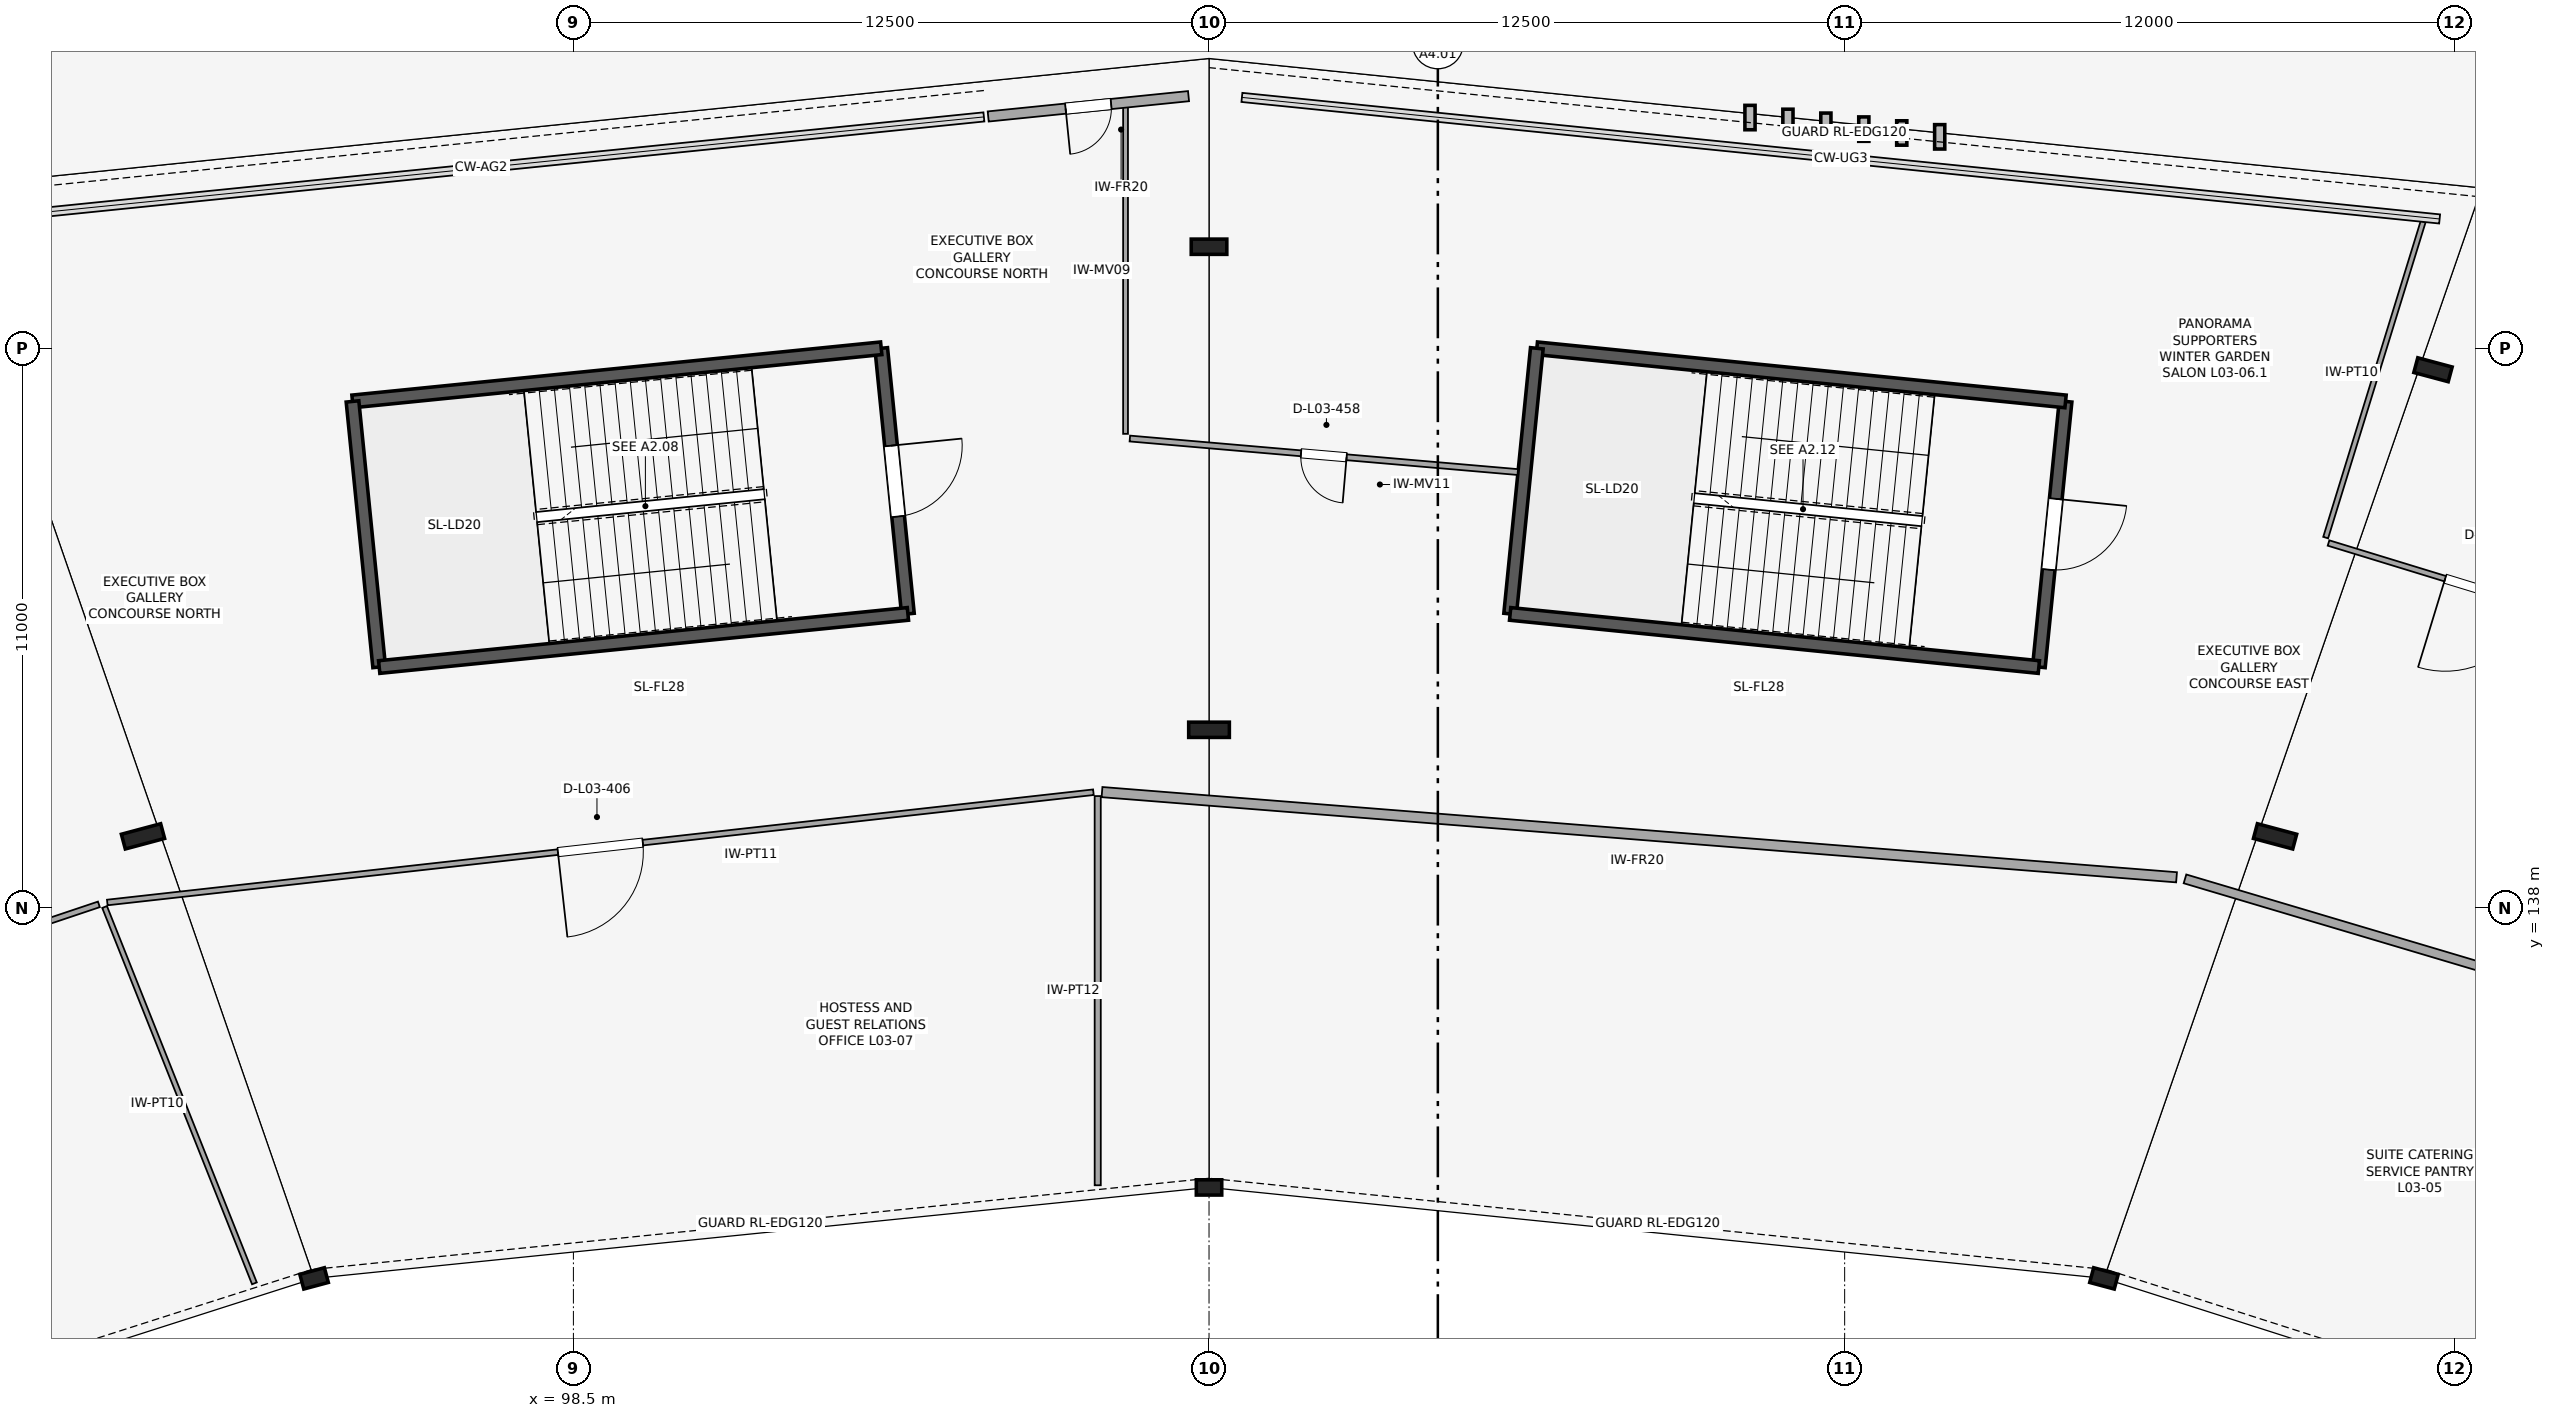
"""IFC4 building model, lengths in metres.
Left out: names, types, materials, properties, quantities, classifications, styles, units other than length and angle.
Written with IfcOpenShell. Run it as: python <this file> out.ifc"""

import sys

from ifc_helpers import new_model, si_unit, direction, frame, frame_2d, origin, origin_2d, place, context, subcontext, project, spatial, rectangle, i_section, extrude, element, fill, save


model = new_model("IFC4")
c1 = context("Model", 3, precision=1e-05, world=origin(), true_north=direction((0.0, 1.0)))
c2 = subcontext(c1, "Body", "Model", "MODEL_VIEW")
j1 = project(units=[si_unit("LENGTHUNIT", "METRE"), si_unit("PLANEANGLEUNIT", "RADIAN")], contexts=[c1])
p1 = place(None, origin())
s1 = spatial("IfcSite", under=j1, at=p1, CompositionType="ELEMENT")
p2 = place(p1, origin())
s2 = spatial("IfcBuilding", under=s1, at=p2, CompositionType="ELEMENT")
p3 = place(p2, frame((0.0, 0.0, 15.6)))
s3 = spatial("IfcBuildingStorey", under=s2, at=p3, CompositionType="ELEMENT", Elevation=15.6)
for number, where, z_axis, x_axis in (
    (1, (128.6, 130.711, 0.0), (0.0, 0.0, 1.0), (0.259, 0.966, 0.0)),
    (2, (111.0, 132.5, 0.0), (0.0, 0.0, 1.0), (0.0, 1.0, 0.0)),
    (3, (93.4, 130.711, 0.0), (0.0, 0.0, 1.0), (-0.259, 0.966, 0.0)),
):
    element("IfcColumn", number, at=place(p3, frame(where, z_axis=z_axis, x_axis=x_axis)), inside=s3, PredefinedType="COLUMN", context=c2, shape_type="SweptSolid", body=[
        extrude(i_section(OverallWidth=0.3, OverallDepth=0.5, WebThickness=0.014, FlangeThickness=0.028, FilletRadius=0.027, at=origin_2d()), origin(), (0.0, 0.0, 1.0), 3.48),
    ])
for number, where, z_axis, x_axis in (
    (4, (131.964, 139.404, 0.0), (0.0, 0.0, 1.0), (0.259, 0.966, 0.0)),
    (5, (111.0, 141.5, 0.0), (0.0, 0.0, 1.0), (0.0, 1.0, 0.0)),
    (6, (90.036, 139.404, 0.0), (0.0, 0.0, 1.0), (-0.259, 0.966, 0.0)),
):
    element("IfcColumn", number, at=place(p3, frame(where, z_axis=z_axis, x_axis=x_axis)), inside=s3, PredefinedType="COLUMN", context=c2, shape_type="SweptSolid", body=[
        extrude(i_section(OverallWidth=0.3, OverallDepth=0.8, WebThickness=0.018, FlangeThickness=0.033, FilletRadius=0.03, at=origin_2d()), origin(), (0.0, 0.0, 1.0), 5.2),
    ])
for number, where, z_axis, x_axis in (
    (7, (135.07, 148.581, 0.0), (0.0, 0.0, 1.0), (0.259, 0.966, 0.0)),
    (8, (111.0, 151.0, 0.0), (0.0, 0.0, 1.0), (0.0, 1.0, 0.0)),
):
    element("IfcColumn", number, at=place(p3, frame(where, z_axis=z_axis, x_axis=x_axis)), inside=s3, PredefinedType="COLUMN", context=c2, shape_type="SweptSolid", body=[
        extrude(i_section(OverallWidth=0.3, OverallDepth=0.7, WebThickness=0.017, FlangeThickness=0.032, FilletRadius=0.027, at=origin_2d()), origin(), (0.0, 0.0, 1.0), 5.2),
    ])
p4 = place(p3, frame((105.079, 143.779, 0.0), z_axis=(0.0, 0.0, 1.0), x_axis=(-0.100028593886, 0.994984562898, 0.0)))
e9 = element("IfcWall", 9, at=p4, inside=s3, PredefinedType="SHEAR", context=c2, shape_type="SweptSolid", body=[
    extrude(rectangle(XDim=5.25, YDim=0.25, at=frame_2d((2.625, 0.0))), origin(), (0.0, 0.0, 1.0), 4.9),
])
p5 = place(p4, frame((1.925, 0.0, 0.0)))
e10 = element("IfcOpeningElement", 10, at=p5, cuts=e9, PredefinedType="OPENING", context=c2, shape_type="SweptSolid", body=[
    extrude(rectangle(XDim=1.4, YDim=2.2, at=frame_2d((0.7, 1.1))), frame((0.0, 0.135, 0.0), z_axis=(0.0, -1.0, 0.0), x_axis=(1.0, 0.0, 0.0)), (0.0, 0.0, 1.0), 0.27),
])
p6 = place(p3, frame((104.553, 149.003, 0.0), z_axis=(0.0, 0.0, 1.0), x_axis=(-0.994985938948, -0.100014905366, 0.0)))
e11 = element("IfcWall", 11, at=p6, inside=s3, PredefinedType="SHEAR", context=c2, shape_type="SweptSolid", body=[
    extrude(rectangle(XDim=10.45, YDim=0.25, at=frame_2d((5.225, 0.0))), origin(), (0.0, 0.0, 1.0), 4.9),
])
p7 = place(p3, frame((94.156, 147.958, 0.0), z_axis=(0.0, 0.0, 1.0), x_axis=(0.100028593886, -0.994984562898, 0.0)))
e12 = element("IfcWall", 12, at=p7, inside=s3, PredefinedType="SHEAR", context=c2, shape_type="SweptSolid", body=[
    extrude(rectangle(XDim=5.25, YDim=0.25, at=frame_2d((2.625, 0.0))), origin(), (0.0, 0.0, 1.0), 4.9),
])
p8 = place(p3, frame((94.681, 142.734, 0.0), z_axis=(0.0, 0.0, 1.0), x_axis=(0.994985938948, 0.100014905366, 0.0)))
e13 = element("IfcWall", 13, at=p8, inside=s3, PredefinedType="SHEAR", context=c2, shape_type="SweptSolid", body=[
    extrude(rectangle(XDim=10.45, YDim=0.25, at=frame_2d((5.225, 0.0))), origin(), (0.0, 0.0, 1.0), 4.9),
])
p9 = place(p3, frame((127.319, 142.734, 0.0), z_axis=(0.0, 0.0, 1.0), x_axis=(0.10002396577, 0.994985028165, 0.0)))
e14 = element("IfcWall", 14, at=p9, inside=s3, PredefinedType="SHEAR", context=c2, shape_type="SweptSolid", body=[
    extrude(rectangle(XDim=5.25, YDim=0.25, at=frame_2d((2.625, 0.0))), origin(), (0.0, 0.0, 1.0), 4.9),
])
p10 = place(p9, frame((1.925, 0.0, 0.0)))
e15 = element("IfcOpeningElement", 15, at=p10, cuts=e14, PredefinedType="OPENING", context=c2, shape_type="SweptSolid", body=[
    extrude(rectangle(XDim=1.4, YDim=2.2, at=frame_2d((0.7, 1.1))), frame((0.0, 0.135, 0.0), z_axis=(0.0, -1.0, 0.0), x_axis=(1.0, 0.0, 0.0)), (0.0, 0.0, 1.0), 0.27),
])
p11 = place(p3, frame((127.844, 147.958, 0.0), z_axis=(0.0, 0.0, 1.0), x_axis=(-0.994988263568, 0.09999177647, 0.0)))
e16 = element("IfcWall", 16, at=p11, inside=s3, PredefinedType="SHEAR", context=c2, shape_type="SweptSolid", body=[
    extrude(rectangle(XDim=10.45, YDim=0.25, at=frame_2d((5.225, 0.0))), origin(), (0.0, 0.0, 1.0), 4.9),
])
p12 = place(p3, frame((117.447, 149.003, 0.0), z_axis=(0.0, 0.0, 1.0), x_axis=(-0.099982555566, -0.994989190184, 0.0)))
e17 = element("IfcWall", 17, at=p12, inside=s3, PredefinedType="SHEAR", context=c2, shape_type="SweptSolid", body=[
    extrude(rectangle(XDim=5.25, YDim=0.25, at=frame_2d((2.625, 0.0))), origin(), (0.0, 0.0, 1.0), 4.9),
])
p13 = place(p3, frame((116.922, 143.779, 0.0), z_axis=(0.0, 0.0, 1.0), x_axis=(0.994985705245, -0.100017230303, 0.0)))
e18 = element("IfcWall", 18, at=p13, inside=s3, PredefinedType="SHEAR", context=c2, shape_type="SweptSolid", body=[
    extrude(rectangle(XDim=10.45, YDim=0.25, at=frame_2d((5.225, 0.0))), origin(), (0.0, 0.0, 1.0), 4.9),
])
p14 = place(p3, frame((149.96, 132.688, 0.0), z_axis=(0.0, 0.0, 1.0), x_axis=(-0.958492296074, 0.285118428668, 0.0)))
e19 = element("IfcWall", 19, at=p14, inside=s3, PredefinedType="PARTITIONING", context=c2, shape_type="SweptSolid", body=[
    extrude(rectangle(XDim=20.623, YDim=0.18, at=frame_2d((10.311, 0.0))), origin(), (0.0, 0.0, 1.0), 2.45),
])
p15 = place(p14, frame((9.861, 0.0, 0.0)))
e20 = element("IfcOpeningElement", 20, at=p15, cuts=e19, PredefinedType="OPENING", context=c2, shape_type="SweptSolid", body=[
    extrude(rectangle(XDim=0.9, YDim=2.24, at=frame_2d((0.45, 1.12))), frame((0.0, 0.1, 0.0), z_axis=(0.0, -1.0, 0.0), x_axis=(1.0, 0.0, 0.0)), (0.0, 0.0, 1.0), 0.2),
])
p16 = place(p3, frame((130.027, 138.599, 0.0), z_axis=(0.0, 0.0, 1.0), x_axis=(-0.996870264064, 0.079054896279, 0.0)))
e21 = element("IfcWall", 21, at=p16, inside=s3, PredefinedType="PARTITIONING", context=c2, shape_type="SweptSolid", body=[
    extrude(rectangle(XDim=21.198, YDim=0.2, at=frame_2d((10.599, 0.0))), origin(), (0.0, 0.0, 1.0), 2.45),
])
p17 = place(p3, frame((108.811, 132.542, 0.0), z_axis=(0.0, 0.0, 1.0), x_axis=(-6.3793818e-05, 0.999999997965, 0.0)))
e22 = element("IfcWall", 22, at=p17, inside=s3, PredefinedType="PARTITIONING", context=c2, shape_type="SweptSolid", body=[
    extrude(rectangle(XDim=7.654, YDim=0.12, at=frame_2d((3.827, 0.0))), origin(), (0.0, 0.0, 1.0), 2.45),
])
p18 = place(p3, frame((108.726, 140.272, 0.0), z_axis=(0.0, 0.0, 1.0), x_axis=(-0.993803678033, -0.111149671744, 0.0)))
e23 = element("IfcWall", 23, at=p18, inside=s3, PredefinedType="PARTITIONING", context=c2, shape_type="SweptSolid", body=[
    extrude(rectangle(XDim=19.514, YDim=0.11, at=frame_2d((9.757, 0.0))), origin(), (0.0, 0.0, 1.0), 2.45),
])
p19 = place(p18, frame((8.917, 0.0, 0.0)))
e24 = element("IfcOpeningElement", 24, at=p19, cuts=e23, PredefinedType="OPENING", context=c2, shape_type="SweptSolid", body=[
    extrude(rectangle(XDim=1.68, YDim=2.24, at=frame_2d((0.84, 1.12))), frame((0.0, 0.065, 0.0), z_axis=(0.0, -1.0, 0.0), x_axis=(1.0, 0.0, 0.0)), (0.0, 0.0, 1.0), 0.13),
])
p20 = place(p3, frame((92.227, 130.614, 0.0), z_axis=(0.0, 0.0, 1.0), x_axis=(-0.369873703132, 0.929082043595, 0.0)))
e25 = element("IfcWall", 25, at=p20, inside=s3, PredefinedType="PARTITIONING", context=c2, shape_type="SweptSolid", body=[
    extrude(rectangle(XDim=7.966, YDim=0.1, at=frame_2d((3.983, 0.0))), origin(), (0.0, 0.0, 1.0), 2.45),
])
p21 = place(p3, frame((89.168, 138.067, 0.0), z_axis=(0.0, 0.0, 1.0), x_axis=(-0.948002856897, -0.318261815671, 0.0)))
e26 = element("IfcWall", 26, at=p21, inside=s3, PredefinedType="MOVABLE", context=c2, shape_type="SweptSolid", body=[
    extrude(rectangle(XDim=20.661, YDim=0.115, at=frame_2d((10.331, 0.0))), origin(), (0.0, 0.0, 1.0), 2.45),
])
p22 = place(p21, frame((9.421, 0.0, 0.0)))
e27 = element("IfcOpeningElement", 27, at=p22, cuts=e26, PredefinedType="OPENING", context=c2, shape_type="SweptSolid", body=[
    extrude(rectangle(XDim=1.82, YDim=2.1, at=frame_2d((0.91, 1.05))), frame((0.0, 0.067, 0.0), z_axis=(0.0, -1.0, 0.0), x_axis=(1.0, 0.0, 0.0)), (0.0, 0.0, 1.0), 0.135),
])
p23 = place(p3, frame((139.344, 143.236, 0.0), z_axis=(0.0, 0.0, 1.0), x_axis=(-0.956207119829, 0.29269086762, 0.0)))
e28 = element("IfcWall", 28, at=p23, inside=s3, PredefinedType="PARTITIONING", context=c2, shape_type="SweptSolid", body=[
    extrude(rectangle(XDim=6.618, YDim=0.11, at=frame_2d((3.309, 0.0))), origin(), (0.0, 0.0, 1.0), 2.45),
])
p24 = place(p23, frame((2.399, 0.0, 0.0)))
e29 = element("IfcOpeningElement", 29, at=p24, cuts=e28, PredefinedType="OPENING", context=c2, shape_type="SweptSolid", body=[
    extrude(rectangle(XDim=1.82, YDim=2.1, at=frame_2d((0.91, 1.05))), frame((0.0, 0.065, 0.0), z_axis=(0.0, -1.0, 0.0), x_axis=(1.0, 0.0, 0.0)), (0.0, 0.0, 1.0), 0.13),
])
p25 = place(p3, frame((132.959, 145.28, 0.0), z_axis=(0.0, 0.0, 1.0), x_axis=(0.294776767563, 0.955566144914, 0.0)))
e30 = element("IfcWall", 30, at=p25, inside=s3, PredefinedType="PARTITIONING", context=c2, shape_type="SweptSolid", body=[
    extrude(rectangle(XDim=6.505, YDim=0.1, at=frame_2d((3.252, 0.0))), origin(), (0.0, 0.0, 1.0), 2.45),
])
p26 = place(p3, frame((117.071, 146.569, 0.0), z_axis=(0.0, 0.0, 1.0), x_axis=(-0.99628984103, 0.086061330803, 0.0)))
e31 = element("IfcWall", 31, at=p26, inside=s3, PredefinedType="MOVABLE", context=c2, shape_type="SweptSolid", body=[
    extrude(rectangle(XDim=7.656, YDim=0.115, at=frame_2d((3.828, 0.0))), origin(), (0.0, 0.0, 1.0), 2.45),
])
p27 = place(p26, frame((3.378, 0.0, 0.0)))
e32 = element("IfcOpeningElement", 32, at=p27, cuts=e31, PredefinedType="OPENING", context=c2, shape_type="SweptSolid", body=[
    extrude(rectangle(XDim=0.9, YDim=2.1, at=frame_2d((0.45, 1.05))), frame((0.0, 0.067, 0.0), z_axis=(0.0, -1.0, 0.0), x_axis=(1.0, 0.0, 0.0)), (0.0, 0.0, 1.0), 0.135),
])
p28 = place(p3, frame((109.358, 147.32, 0.0), z_axis=(0.0, 0.0, 1.0), x_axis=(0.0, 1.0, 0.0)))
e33 = element("IfcWall", 33, at=p28, inside=s3, PredefinedType="MOVABLE", context=c2, shape_type="SweptSolid", body=[
    extrude(rectangle(XDim=6.43, YDim=0.095, at=frame_2d((3.215, 0.0))), origin(), (0.0, 0.0, 1.0), 2.45),
])
p29 = place(p3, frame((110.597, 153.961, 0.0), z_axis=(0.0, 0.0, 1.0), x_axis=(-0.994893944584, -0.100925908613, 0.0)))
e34 = element("IfcWall", 34, at=p29, inside=s3, PredefinedType="PARTITIONING", context=c2, shape_type="SweptSolid", body=[
    extrude(rectangle(XDim=3.96, YDim=0.2, at=frame_2d((1.98, 0.0))), origin(), (0.0, 0.0, 1.0), 2.45),
])
p30 = place(p29, frame((1.53, 0.0, 0.0)))
e35 = element("IfcOpeningElement", 35, at=p30, cuts=e34, PredefinedType="OPENING", context=c2, shape_type="SweptSolid", body=[
    extrude(rectangle(XDim=0.9, YDim=2.24, at=frame_2d((0.45, 1.12))), frame((0.0, 0.11, 0.0), z_axis=(0.0, -1.0, 0.0), x_axis=(1.0, 0.0, 0.0)), (0.0, 0.0, 1.0), 0.22),
])
p31 = place(p5, frame((1.4, 0.0, 0.0), z_axis=(0.0, 0.0, 1.0), x_axis=(-1.0, 0.0, 0.0)))
e36 = element("IfcDoor", 36, at=p31, inside=s3, OperationType="SINGLE_SWING_LEFT", PredefinedType="DOOR", context=c2, shape_type="SweptSolid", body=[
    extrude(rectangle(XDim=1.4, YDim=2.2, at=frame_2d((0.7, 1.1))), frame((0.0, 0.025, 0.0), z_axis=(0.0, -1.0, 0.0), x_axis=(1.0, 0.0, 0.0)), (0.0, 0.0, 1.0), 0.05),
])
fill(e10, e36)
p32 = place(p10, frame((1.4, 0.0, 0.0), z_axis=(0.0, 0.0, 1.0), x_axis=(-1.0, 0.0, 0.0)))
e37 = element("IfcDoor", 37, at=p32, inside=s3, OperationType="SINGLE_SWING_LEFT", PredefinedType="DOOR", context=c2, shape_type="SweptSolid", body=[
    extrude(rectangle(XDim=1.4, YDim=2.2, at=frame_2d((0.7, 1.1))), frame((0.0, 0.025, 0.0), z_axis=(0.0, -1.0, 0.0), x_axis=(1.0, 0.0, 0.0)), (0.0, 0.0, 1.0), 0.05),
])
fill(e15, e37)
p33 = place(p19, origin())
e38 = element("IfcDoor", 38, at=p33, inside=s3, OperationType="SINGLE_SWING_RIGHT", PredefinedType="DOOR", context=c2, shape_type="SweptSolid", body=[
    extrude(rectangle(XDim=1.68, YDim=2.24, at=frame_2d((0.84, 1.12))), frame((0.0, 0.025, 0.0), z_axis=(0.0, -1.0, 0.0), x_axis=(1.0, 0.0, 0.0)), (0.0, 0.0, 1.0), 0.05),
])
fill(e24, e38)
p34 = place(p24, origin())
e39 = element("IfcDoor", 39, at=p34, inside=s3, OperationType="SINGLE_SWING_RIGHT", PredefinedType="DOOR", context=c2, shape_type="SweptSolid", body=[
    extrude(rectangle(XDim=1.82, YDim=2.1, at=frame_2d((0.91, 1.05))), frame((0.0, 0.025, 0.0), z_axis=(0.0, -1.0, 0.0), x_axis=(1.0, 0.0, 0.0)), (0.0, 0.0, 1.0), 0.05),
])
fill(e29, e39)
p35 = place(p27, origin())
e40 = element("IfcDoor", 40, at=p35, inside=s3, OperationType="SINGLE_SWING_LEFT", PredefinedType="DOOR", context=c2, shape_type="SweptSolid", body=[
    extrude(rectangle(XDim=0.9, YDim=2.1, at=frame_2d((0.45, 1.05))), frame((0.0, 0.025, 0.0), z_axis=(0.0, -1.0, 0.0), x_axis=(1.0, 0.0, 0.0)), (0.0, 0.0, 1.0), 0.05),
])
fill(e32, e40)
p36 = place(p30, origin())
e41 = element("IfcDoor", 41, at=p36, inside=s3, OperationType="SINGLE_SWING_RIGHT", PredefinedType="DOOR", context=c2, shape_type="SweptSolid", body=[
    extrude(rectangle(XDim=0.9, YDim=2.24, at=frame_2d((0.45, 1.12))), frame((0.0, 0.025, 0.0), z_axis=(0.0, -1.0, 0.0), x_axis=(1.0, 0.0, 0.0)), (0.0, 0.0, 1.0), 0.05),
])
fill(e35, e41)
save(model, sys.argv[1])
